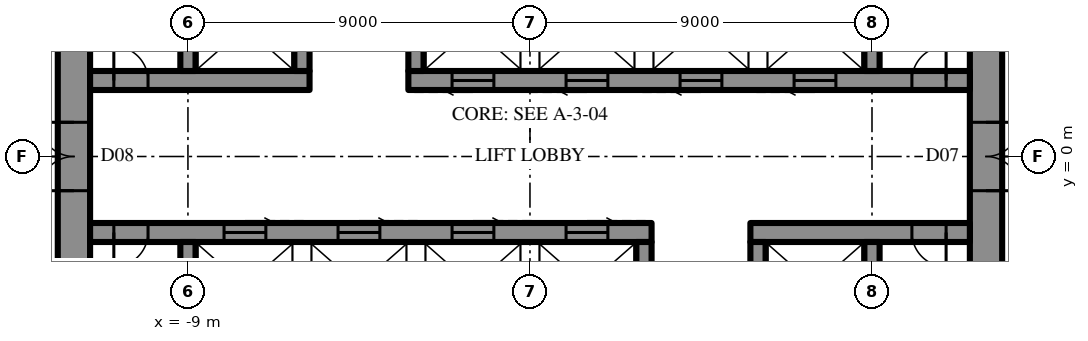
"""IFC4 building model, lengths in metres.
Left out: names, types, materials, properties, quantities, classifications, styles, units other than length and angle.
Written with IfcOpenShell. Run it as: python <this file> out.ifc"""

import sys

from ifc_helpers import new_model, si_unit, direction, frame, frame_2d, origin, place, context, subcontext, project, spatial, rectangle, extrude, element, fill, save


model = new_model("IFC4")
c1 = context("Model", 3, precision=1e-05, world=origin(), true_north=direction((0.0, 1.0)))
c2 = subcontext(c1, "Body", "Model", "MODEL_VIEW")
j1 = project(units=[si_unit("LENGTHUNIT", "METRE"), si_unit("PLANEANGLEUNIT", "RADIAN")], contexts=[c1])
p1 = place(None, origin())
s1 = spatial("IfcSite", under=j1, at=p1, CompositionType="ELEMENT")
p2 = place(p1, origin())
s2 = spatial("IfcBuilding", under=s1, at=p2, CompositionType="ELEMENT")
p3 = place(p2, frame((0.0, 0.0, 366.1)))
s3 = spatial("IfcBuildingStorey", under=s2, at=p3, CompositionType="ELEMENT", Elevation=366.1)
p4 = place(p3, frame((12.0, -10.7, 0.0), z_axis=(0.0, 0.0, 1.0), x_axis=(0.0, 1.0, 0.0)))
e1 = element("IfcWall", 1, at=p4, inside=s3, PredefinedType="SHEAR", context=c2, shape_type="SweptSolid", body=[
    extrude(rectangle(XDim=21.4, YDim=0.85, at=frame_2d((10.7, 0.0))), origin(), (0.0, 0.0, 1.0), 4.2),
])
p5 = place(p4, frame((9.8, 0.0, 0.0)))
e2 = element("IfcOpeningElement", 2, at=p5, cuts=e1, PredefinedType="OPENING", context=c2, shape_type="SweptSolid", body=[
    extrude(rectangle(XDim=1.8, YDim=2.4, at=frame_2d((0.9, 1.2))), frame((0.0, 0.435, 0.0), z_axis=(0.0, -1.0, 0.0), x_axis=(1.0, 0.0, 0.0)), (0.0, 0.0, 1.0), 0.87),
])
p6 = place(p3, frame((-12.0, 10.7, 0.0), z_axis=(0.0, 0.0, 1.0), x_axis=(0.0, -1.0, 0.0)))
e3 = element("IfcWall", 3, at=p6, inside=s3, PredefinedType="SHEAR", context=c2, shape_type="SweptSolid", body=[
    extrude(rectangle(XDim=21.4, YDim=0.85, at=frame_2d((10.7, 0.0))), origin(), (0.0, 0.0, 1.0), 4.2),
])
p7 = place(p6, frame((9.8, 0.0, 0.0)))
e4 = element("IfcOpeningElement", 4, at=p7, cuts=e3, PredefinedType="OPENING", context=c2, shape_type="SweptSolid", body=[
    extrude(rectangle(XDim=1.8, YDim=2.4, at=frame_2d((0.9, 1.2))), frame((0.0, 0.435, 0.0), z_axis=(0.0, -1.0, 0.0), x_axis=(1.0, 0.0, 0.0)), (0.0, 0.0, 1.0), 0.87),
])
p8 = place(p3, frame((-11.575, 2.0, 0.0), z_axis=(0.0, 0.0, 1.0), x_axis=(1.0, 0.0, 0.0)))
e5 = element("IfcWall", 5, at=p8, inside=s3, PredefinedType="SHEAR", context=c2, shape_type="SweptSolid", body=[
    extrude(rectangle(XDim=5.775, YDim=0.5, at=frame_2d((2.887, 0.0))), origin(), (0.0, 0.0, 1.0), 4.2),
])
p9 = place(p8, frame((0.625, 0.0, 0.0)))
e6 = element("IfcOpeningElement", 6, at=p9, cuts=e5, PredefinedType="OPENING", context=c2, shape_type="SweptSolid", body=[
    extrude(rectangle(XDim=0.9, YDim=2.2, at=frame_2d((0.45, 1.1))), frame((0.0, 0.26, 0.0), z_axis=(0.0, -1.0, 0.0), x_axis=(1.0, 0.0, 0.0)), (0.0, 0.0, 1.0), 0.52),
])
p10 = place(p3, frame((-3.2, 2.0, 0.0), z_axis=(0.0, 0.0, 1.0), x_axis=(1.0, 0.0, 0.0)))
e7 = element("IfcWall", 7, at=p10, inside=s3, PredefinedType="SHEAR", context=c2, shape_type="SweptSolid", body=[
    extrude(rectangle(XDim=14.775, YDim=0.5, at=frame_2d((7.387, 0.0))), origin(), (0.0, 0.0, 1.0), 4.2),
])
p11 = place(p10, frame((13.25, 0.0, 0.0)))
e8 = element("IfcOpeningElement", 8, at=p11, cuts=e7, PredefinedType="OPENING", context=c2, shape_type="SweptSolid", body=[
    extrude(rectangle(XDim=0.9, YDim=2.2, at=frame_2d((0.45, 1.1))), frame((0.0, 0.26, 0.0), z_axis=(0.0, -1.0, 0.0), x_axis=(1.0, 0.0, 0.0)), (0.0, 0.0, 1.0), 0.52),
])
p12 = place(p10, frame((1.15, 0.0, 0.0)))
e9 = element("IfcOpeningElement", 9, at=p12, cuts=e7, PredefinedType="OPENING", context=c2, shape_type="SweptSolid", body=[
    extrude(rectangle(XDim=1.1, YDim=2.2, at=frame_2d((0.55, 1.1))), frame((0.0, 0.26, 0.0), z_axis=(0.0, -1.0, 0.0), x_axis=(1.0, 0.0, 0.0)), (0.0, 0.0, 1.0), 0.52),
])
p13 = place(p10, frame((4.15, 0.0, 0.0)))
e10 = element("IfcOpeningElement", 10, at=p13, cuts=e7, PredefinedType="OPENING", context=c2, shape_type="SweptSolid", body=[
    extrude(rectangle(XDim=1.1, YDim=2.2, at=frame_2d((0.55, 1.1))), frame((0.0, 0.26, 0.0), z_axis=(0.0, -1.0, 0.0), x_axis=(1.0, 0.0, 0.0)), (0.0, 0.0, 1.0), 0.52),
])
p14 = place(p10, frame((7.15, 0.0, 0.0)))
e11 = element("IfcOpeningElement", 11, at=p14, cuts=e7, PredefinedType="OPENING", context=c2, shape_type="SweptSolid", body=[
    extrude(rectangle(XDim=1.1, YDim=2.2, at=frame_2d((0.55, 1.1))), frame((0.0, 0.26, 0.0), z_axis=(0.0, -1.0, 0.0), x_axis=(1.0, 0.0, 0.0)), (0.0, 0.0, 1.0), 0.52),
])
p15 = place(p10, frame((10.15, 0.0, 0.0)))
e12 = element("IfcOpeningElement", 12, at=p15, cuts=e7, PredefinedType="OPENING", context=c2, shape_type="SweptSolid", body=[
    extrude(rectangle(XDim=1.1, YDim=2.2, at=frame_2d((0.55, 1.1))), frame((0.0, 0.26, 0.0), z_axis=(0.0, -1.0, 0.0), x_axis=(1.0, 0.0, 0.0)), (0.0, 0.0, 1.0), 0.52),
])
for number, where, z_axis, x_axis in (
    (13, (-9.0, 2.25, 0.0), (0.0, 0.0, 1.0), (0.0, 1.0, 0.0)),
    (14, (-6.0, 2.25, 0.0), (0.0, 0.0, 1.0), (0.0, 1.0, 0.0)),
    (15, (-3.0, 2.25, 0.0), (0.0, 0.0, 1.0), (0.0, 1.0, 0.0)),
    (16, (9.0, 2.25, 0.0), (0.0, 0.0, 1.0), (0.0, 1.0, 0.0)),
):
    element("IfcWall", number, at=place(p3, frame(where, z_axis=z_axis, x_axis=x_axis)), inside=s3, PredefinedType="SHEAR", context=c2, shape_type="SweptSolid", body=[
        extrude(rectangle(XDim=2.3, YDim=0.4, at=frame_2d((1.15, 0.0))), origin(), (0.0, 0.0, 1.0), 4.2),
    ])
p16 = place(p3, frame((11.575, -2.0, 0.0), z_axis=(0.0, 0.0, 1.0), x_axis=(-1.0, 0.0, 0.0)))
e17 = element("IfcWall", 17, at=p16, inside=s3, PredefinedType="SHEAR", context=c2, shape_type="SweptSolid", body=[
    extrude(rectangle(XDim=5.775, YDim=0.5, at=frame_2d((2.887, 0.0))), origin(), (0.0, 0.0, 1.0), 4.2),
])
p17 = place(p16, frame((0.625, 0.0, 0.0)))
e18 = element("IfcOpeningElement", 18, at=p17, cuts=e17, PredefinedType="OPENING", context=c2, shape_type="SweptSolid", body=[
    extrude(rectangle(XDim=0.9, YDim=2.2, at=frame_2d((0.45, 1.1))), frame((0.0, 0.26, 0.0), z_axis=(0.0, -1.0, 0.0), x_axis=(1.0, 0.0, 0.0)), (0.0, 0.0, 1.0), 0.52),
])
p18 = place(p3, frame((3.2, -2.0, 0.0), z_axis=(0.0, 0.0, 1.0), x_axis=(-1.0, 0.0, 0.0)))
e19 = element("IfcWall", 19, at=p18, inside=s3, PredefinedType="SHEAR", context=c2, shape_type="SweptSolid", body=[
    extrude(rectangle(XDim=14.775, YDim=0.5, at=frame_2d((7.387, 0.0))), origin(), (0.0, 0.0, 1.0), 4.2),
])
p19 = place(p18, frame((13.25, 0.0, 0.0)))
e20 = element("IfcOpeningElement", 20, at=p19, cuts=e19, PredefinedType="OPENING", context=c2, shape_type="SweptSolid", body=[
    extrude(rectangle(XDim=0.9, YDim=2.2, at=frame_2d((0.45, 1.1))), frame((0.0, 0.26, 0.0), z_axis=(0.0, -1.0, 0.0), x_axis=(1.0, 0.0, 0.0)), (0.0, 0.0, 1.0), 0.52),
])
p20 = place(p18, frame((1.15, 0.0, 0.0)))
e21 = element("IfcOpeningElement", 21, at=p20, cuts=e19, PredefinedType="OPENING", context=c2, shape_type="SweptSolid", body=[
    extrude(rectangle(XDim=1.1, YDim=2.2, at=frame_2d((0.55, 1.1))), frame((0.0, 0.26, 0.0), z_axis=(0.0, -1.0, 0.0), x_axis=(1.0, 0.0, 0.0)), (0.0, 0.0, 1.0), 0.52),
])
p21 = place(p18, frame((4.15, 0.0, 0.0)))
e22 = element("IfcOpeningElement", 22, at=p21, cuts=e19, PredefinedType="OPENING", context=c2, shape_type="SweptSolid", body=[
    extrude(rectangle(XDim=1.1, YDim=2.2, at=frame_2d((0.55, 1.1))), frame((0.0, 0.26, 0.0), z_axis=(0.0, -1.0, 0.0), x_axis=(1.0, 0.0, 0.0)), (0.0, 0.0, 1.0), 0.52),
])
p22 = place(p18, frame((7.15, 0.0, 0.0)))
e23 = element("IfcOpeningElement", 23, at=p22, cuts=e19, PredefinedType="OPENING", context=c2, shape_type="SweptSolid", body=[
    extrude(rectangle(XDim=1.1, YDim=2.2, at=frame_2d((0.55, 1.1))), frame((0.0, 0.26, 0.0), z_axis=(0.0, -1.0, 0.0), x_axis=(1.0, 0.0, 0.0)), (0.0, 0.0, 1.0), 0.52),
])
p23 = place(p18, frame((10.15, 0.0, 0.0)))
e24 = element("IfcOpeningElement", 24, at=p23, cuts=e19, PredefinedType="OPENING", context=c2, shape_type="SweptSolid", body=[
    extrude(rectangle(XDim=1.1, YDim=2.2, at=frame_2d((0.55, 1.1))), frame((0.0, 0.26, 0.0), z_axis=(0.0, -1.0, 0.0), x_axis=(1.0, 0.0, 0.0)), (0.0, 0.0, 1.0), 0.52),
])
for number, where, z_axis, x_axis in (
    (25, (9.0, -2.25, 0.0), (0.0, 0.0, 1.0), (0.0, -1.0, 0.0)),
    (26, (6.0, -2.25, 0.0), (0.0, 0.0, 1.0), (0.0, -1.0, 0.0)),
    (27, (3.0, -2.25, 0.0), (0.0, 0.0, 1.0), (0.0, -1.0, 0.0)),
    (28, (-9.0, -2.25, 0.0), (0.0, 0.0, 1.0), (0.0, -1.0, 0.0)),
):
    element("IfcWall", number, at=place(p3, frame(where, z_axis=z_axis, x_axis=x_axis)), inside=s3, PredefinedType="SHEAR", context=c2, shape_type="SweptSolid", body=[
        extrude(rectangle(XDim=2.3, YDim=0.4, at=frame_2d((1.15, 0.0))), origin(), (0.0, 0.0, 1.0), 4.2),
    ])
p24 = place(p5, frame((1.8, 0.0, 0.0), z_axis=(0.0, 0.0, 1.0), x_axis=(-1.0, 0.0, 0.0)))
e29 = element("IfcDoor", 29, at=p24, inside=s3, OperationType="DOUBLE_DOOR_SINGLE_SWING", PredefinedType="DOOR", context=c2, shape_type="SweptSolid", body=[
    extrude(rectangle(XDim=1.8, YDim=2.4, at=frame_2d((0.9, 1.2))), frame((0.0, 0.025, 0.0), z_axis=(0.0, -1.0, 0.0), x_axis=(1.0, 0.0, 0.0)), (0.0, 0.0, 1.0), 0.05),
])
fill(e2, e29)
p25 = place(p7, frame((1.8, 0.0, 0.0), z_axis=(0.0, 0.0, 1.0), x_axis=(-1.0, 0.0, 0.0)))
e30 = element("IfcDoor", 30, at=p25, inside=s3, OperationType="DOUBLE_DOOR_SINGLE_SWING", PredefinedType="DOOR", context=c2, shape_type="SweptSolid", body=[
    extrude(rectangle(XDim=1.8, YDim=2.4, at=frame_2d((0.9, 1.2))), frame((0.0, 0.025, 0.0), z_axis=(0.0, -1.0, 0.0), x_axis=(1.0, 0.0, 0.0)), (0.0, 0.0, 1.0), 0.05),
])
fill(e4, e30)
p26 = place(p9, origin())
e31 = element("IfcDoor", 31, at=p26, inside=s3, OperationType="SINGLE_SWING_RIGHT", PredefinedType="DOOR", context=c2, shape_type="SweptSolid", body=[
    extrude(rectangle(XDim=0.9, YDim=2.2, at=frame_2d((0.45, 1.1))), frame((0.0, 0.025, 0.0), z_axis=(0.0, -1.0, 0.0), x_axis=(1.0, 0.0, 0.0)), (0.0, 0.0, 1.0), 0.05),
])
fill(e6, e31)
p27 = place(p11, origin())
e32 = element("IfcDoor", 32, at=p27, inside=s3, OperationType="SINGLE_SWING_LEFT", PredefinedType="DOOR", context=c2, shape_type="SweptSolid", body=[
    extrude(rectangle(XDim=0.9, YDim=2.2, at=frame_2d((0.45, 1.1))), frame((0.0, 0.025, 0.0), z_axis=(0.0, -1.0, 0.0), x_axis=(1.0, 0.0, 0.0)), (0.0, 0.0, 1.0), 0.05),
])
fill(e8, e32)
p28 = place(p17, origin())
e33 = element("IfcDoor", 33, at=p28, inside=s3, OperationType="SINGLE_SWING_RIGHT", PredefinedType="DOOR", context=c2, shape_type="SweptSolid", body=[
    extrude(rectangle(XDim=0.9, YDim=2.2, at=frame_2d((0.45, 1.1))), frame((0.0, 0.025, 0.0), z_axis=(0.0, -1.0, 0.0), x_axis=(1.0, 0.0, 0.0)), (0.0, 0.0, 1.0), 0.05),
])
fill(e18, e33)
p29 = place(p19, origin())
e34 = element("IfcDoor", 34, at=p29, inside=s3, OperationType="SINGLE_SWING_LEFT", PredefinedType="DOOR", context=c2, shape_type="SweptSolid", body=[
    extrude(rectangle(XDim=0.9, YDim=2.2, at=frame_2d((0.45, 1.1))), frame((0.0, 0.025, 0.0), z_axis=(0.0, -1.0, 0.0), x_axis=(1.0, 0.0, 0.0)), (0.0, 0.0, 1.0), 0.05),
])
fill(e20, e34)
p30 = place(p12, frame((1.1, 0.0, 0.0), z_axis=(0.0, 0.0, 1.0), x_axis=(-1.0, 0.0, 0.0)))
e35 = element("IfcDoor", 35, at=p30, inside=s3, OperationType="SLIDING_TO_LEFT", PredefinedType="DOOR", context=c2, shape_type="SweptSolid", body=[
    extrude(rectangle(XDim=1.1, YDim=2.2, at=frame_2d((0.55, 1.1))), frame((0.0, 0.025, 0.0), z_axis=(0.0, -1.0, 0.0), x_axis=(1.0, 0.0, 0.0)), (0.0, 0.0, 1.0), 0.05),
])
fill(e9, e35)
p31 = place(p13, frame((1.1, 0.0, 0.0), z_axis=(0.0, 0.0, 1.0), x_axis=(-1.0, 0.0, 0.0)))
e36 = element("IfcDoor", 36, at=p31, inside=s3, OperationType="SLIDING_TO_LEFT", PredefinedType="DOOR", context=c2, shape_type="SweptSolid", body=[
    extrude(rectangle(XDim=1.1, YDim=2.2, at=frame_2d((0.55, 1.1))), frame((0.0, 0.025, 0.0), z_axis=(0.0, -1.0, 0.0), x_axis=(1.0, 0.0, 0.0)), (0.0, 0.0, 1.0), 0.05),
])
fill(e10, e36)
p32 = place(p14, frame((1.1, 0.0, 0.0), z_axis=(0.0, 0.0, 1.0), x_axis=(-1.0, 0.0, 0.0)))
e37 = element("IfcDoor", 37, at=p32, inside=s3, OperationType="SLIDING_TO_LEFT", PredefinedType="DOOR", context=c2, shape_type="SweptSolid", body=[
    extrude(rectangle(XDim=1.1, YDim=2.2, at=frame_2d((0.55, 1.1))), frame((0.0, 0.025, 0.0), z_axis=(0.0, -1.0, 0.0), x_axis=(1.0, 0.0, 0.0)), (0.0, 0.0, 1.0), 0.05),
])
fill(e11, e37)
p33 = place(p15, frame((1.1, 0.0, 0.0), z_axis=(0.0, 0.0, 1.0), x_axis=(-1.0, 0.0, 0.0)))
e38 = element("IfcDoor", 38, at=p33, inside=s3, OperationType="SLIDING_TO_LEFT", PredefinedType="DOOR", context=c2, shape_type="SweptSolid", body=[
    extrude(rectangle(XDim=1.1, YDim=2.2, at=frame_2d((0.55, 1.1))), frame((0.0, 0.025, 0.0), z_axis=(0.0, -1.0, 0.0), x_axis=(1.0, 0.0, 0.0)), (0.0, 0.0, 1.0), 0.05),
])
fill(e12, e38)
p34 = place(p20, frame((1.1, 0.0, 0.0), z_axis=(0.0, 0.0, 1.0), x_axis=(-1.0, 0.0, 0.0)))
e39 = element("IfcDoor", 39, at=p34, inside=s3, OperationType="SLIDING_TO_LEFT", PredefinedType="DOOR", context=c2, shape_type="SweptSolid", body=[
    extrude(rectangle(XDim=1.1, YDim=2.2, at=frame_2d((0.55, 1.1))), frame((0.0, 0.025, 0.0), z_axis=(0.0, -1.0, 0.0), x_axis=(1.0, 0.0, 0.0)), (0.0, 0.0, 1.0), 0.05),
])
fill(e21, e39)
p35 = place(p21, frame((1.1, 0.0, 0.0), z_axis=(0.0, 0.0, 1.0), x_axis=(-1.0, 0.0, 0.0)))
e40 = element("IfcDoor", 40, at=p35, inside=s3, OperationType="SLIDING_TO_LEFT", PredefinedType="DOOR", context=c2, shape_type="SweptSolid", body=[
    extrude(rectangle(XDim=1.1, YDim=2.2, at=frame_2d((0.55, 1.1))), frame((0.0, 0.025, 0.0), z_axis=(0.0, -1.0, 0.0), x_axis=(1.0, 0.0, 0.0)), (0.0, 0.0, 1.0), 0.05),
])
fill(e22, e40)
p36 = place(p22, frame((1.1, 0.0, 0.0), z_axis=(0.0, 0.0, 1.0), x_axis=(-1.0, 0.0, 0.0)))
e41 = element("IfcDoor", 41, at=p36, inside=s3, OperationType="SLIDING_TO_LEFT", PredefinedType="DOOR", context=c2, shape_type="SweptSolid", body=[
    extrude(rectangle(XDim=1.1, YDim=2.2, at=frame_2d((0.55, 1.1))), frame((0.0, 0.025, 0.0), z_axis=(0.0, -1.0, 0.0), x_axis=(1.0, 0.0, 0.0)), (0.0, 0.0, 1.0), 0.05),
])
fill(e23, e41)
p37 = place(p23, frame((1.1, 0.0, 0.0), z_axis=(0.0, 0.0, 1.0), x_axis=(-1.0, 0.0, 0.0)))
e42 = element("IfcDoor", 42, at=p37, inside=s3, OperationType="SLIDING_TO_LEFT", PredefinedType="DOOR", context=c2, shape_type="SweptSolid", body=[
    extrude(rectangle(XDim=1.1, YDim=2.2, at=frame_2d((0.55, 1.1))), frame((0.0, 0.025, 0.0), z_axis=(0.0, -1.0, 0.0), x_axis=(1.0, 0.0, 0.0)), (0.0, 0.0, 1.0), 0.05),
])
fill(e24, e42)
save(model, sys.argv[1])
